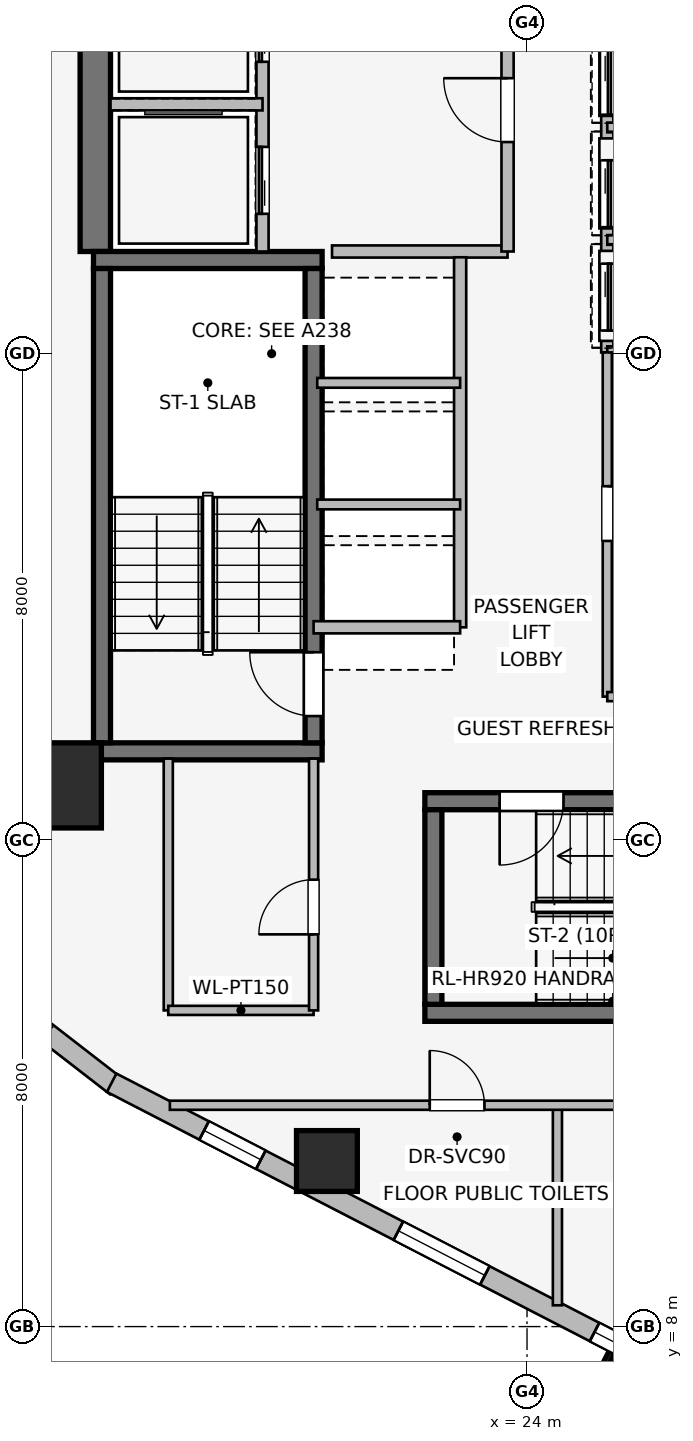
"""IFC4 building model, lengths in metres.
Left out: names, types, materials, properties, quantities, classifications, styles, units other than length and angle.
Written with IfcOpenShell. Run it as: python <this file> out.ifc"""

import sys

from ifc_helpers import new_model, si_unit, direction, frame, frame_2d, origin, origin_2d, place, context, subcontext, project, spatial, rectangle, extrude, element, fill, save


model = new_model("IFC4")
c1 = context("Model", 3, precision=1e-05, world=origin(), true_north=direction((0.0, 1.0)))
c2 = subcontext(c1, "Body", "Model", "MODEL_VIEW")
j1 = project(units=[si_unit("LENGTHUNIT", "METRE"), si_unit("PLANEANGLEUNIT", "RADIAN")], contexts=[c1])
p1 = place(None, origin())
s1 = spatial("IfcSite", under=j1, at=p1, CompositionType="ELEMENT")
p2 = place(p1, origin())
s2 = spatial("IfcBuilding", under=s1, at=p2, CompositionType="ELEMENT")
p3 = place(p2, frame((0.0, 0.0, 136.05)))
s3 = spatial("IfcBuildingStorey", under=s2, at=p3, CompositionType="ELEMENT", Elevation=136.05)
p4 = place(p3, frame((16.9, 25.68, 0.0), z_axis=(0.0, 0.0, 1.0), x_axis=(0.0, 1.0, 0.0)))
e1 = element("IfcWall", 1, at=p4, inside=s3, PredefinedType="SHEAR", context=c2, shape_type="SweptSolid", body=[
    extrude(rectangle(XDim=5.62, YDim=0.5, at=frame_2d((2.81, 0.0))), origin(), (0.0, 0.0, 1.0), 3.45),
])
for number, where, z_axis, x_axis in (
    (2, (16.87, 17.46, 0.0), (0.0, 0.0, 1.0), (1.0, 0.0, 0.0)),
    (3, (20.63, 25.54, 0.0), (0.0, 0.0, 1.0), (-1.0, 0.0, 0.0)),
):
    element("IfcWall", number, at=place(p3, frame(where, z_axis=z_axis, x_axis=x_axis)), inside=s3, PredefinedType="SHEAR", context=c2, shape_type="SweptSolid", body=[
        extrude(rectangle(XDim=3.76, YDim=0.28, at=frame_2d((1.88, 0.0))), origin(), (0.0, 0.0, 1.0), 3.45),
    ])
p5 = place(p3, frame((17.01, 25.4, 0.0), z_axis=(0.0, 0.0, 1.0), x_axis=(0.0, -1.0, 0.0)))
e4 = element("IfcWall", 4, at=p5, inside=s3, PredefinedType="SHEAR", context=c2, shape_type="SweptSolid", body=[
    extrude(rectangle(XDim=7.8, YDim=0.28, at=frame_2d((3.9, 0.0))), origin(), (0.0, 0.0, 1.0), 3.45),
])
p6 = place(p3, frame((20.49, 17.6, 0.0), z_axis=(0.0, 0.0, 1.0), x_axis=(0.0, 1.0, 0.0)))
e5 = element("IfcWall", 5, at=p6, inside=s3, PredefinedType="SHEAR", context=c2, shape_type="SweptSolid", body=[
    extrude(rectangle(XDim=7.8, YDim=0.28, at=frame_2d((3.9, 0.0))), origin(), (0.0, 0.0, 1.0), 3.45),
])
p7 = place(p6, frame((0.44, 0.0, 0.0)))
e6 = element("IfcOpeningElement", 6, at=p7, cuts=e5, PredefinedType="OPENING", context=c2, shape_type="SweptSolid", body=[
    extrude(rectangle(XDim=1.05, YDim=2.0, at=frame_2d((0.525, 1.0))), frame((0.0, 0.15, 0.0), z_axis=(0.0, -1.0, 0.0), x_axis=(1.0, 0.0, 0.0)), (0.0, 0.0, 1.0), 0.3),
])
p8 = place(p3, frame((22.32, 13.16, 0.0), z_axis=(0.0, 0.0, 1.0), x_axis=(1.0, 0.0, 0.0)))
e7 = element("IfcWall", 7, at=p8, inside=s3, PredefinedType="SHEAR", context=c2, shape_type="SweptSolid", body=[
    extrude(rectangle(XDim=8.36, YDim=0.28, at=frame_2d((4.18, 0.0))), origin(), (0.0, 0.0, 1.0), 3.45),
])
p9 = place(p3, frame((30.68, 16.64, 0.0), z_axis=(0.0, 0.0, 1.0), x_axis=(-1.0, 0.0, 0.0)))
e8 = element("IfcWall", 8, at=p9, inside=s3, PredefinedType="SHEAR", context=c2, shape_type="SweptSolid", body=[
    extrude(rectangle(XDim=8.36, YDim=0.28, at=frame_2d((4.18, 0.0))), origin(), (0.0, 0.0, 1.0), 3.45),
])
p10 = place(p9, frame((6.08, 0.0, 0.0)))
e9 = element("IfcOpeningElement", 9, at=p10, cuts=e8, PredefinedType="OPENING", context=c2, shape_type="SweptSolid", body=[
    extrude(rectangle(XDim=1.05, YDim=2.0, at=frame_2d((0.525, 1.0))), frame((0.0, 0.15, 0.0), z_axis=(0.0, -1.0, 0.0), x_axis=(1.0, 0.0, 0.0)), (0.0, 0.0, 1.0), 0.3),
])
p11 = place(p3, frame((22.46, 16.5, 0.0), z_axis=(0.0, 0.0, 1.0), x_axis=(0.0, -1.0, 0.0)))
e10 = element("IfcWall", 10, at=p11, inside=s3, PredefinedType="SHEAR", context=c2, shape_type="SweptSolid", body=[
    extrude(rectangle(XDim=3.2, YDim=0.28, at=frame_2d((1.6, 0.0))), origin(), (0.0, 0.0, 1.0), 3.45),
])
p12 = place(p3, frame((16.3, 16.9, 0.0), z_axis=(0.0, 0.0, 1.0), x_axis=(1.0, 0.0, 0.0)))
e11 = element("IfcColumn", 11, at=p12, inside=s3, PredefinedType="COLUMN", context=c2, shape_type="SweptSolid", body=[
    extrude(rectangle(XDim=1.4, YDim=1.4, at=origin_2d()), origin(), (0.0, 0.0, 1.0), 3.45),
])
p13 = place(p3, frame((20.709, 10.723, 0.0), z_axis=(0.0, 0.0, 1.0), x_axis=(1.0, 0.0, 0.0)))
e12 = element("IfcColumn", 12, at=p13, inside=s3, PredefinedType="COLUMN", context=c2, shape_type="SweptSolid", body=[
    extrude(rectangle(XDim=1.0, YDim=1.0, at=origin_2d()), origin(), (0.0, 0.0, 1.0), 3.45),
])
p14 = place(p3, frame((17.243, 11.95, 0.0), z_axis=(0.0, 0.0, 1.0), x_axis=(-0.790621329885, 0.612305408053, 0.0)))
e13 = element("IfcWall", 13, at=p14, inside=s3, PredefinedType="STANDARD", context=c2, shape_type="SweptSolid", body=[
    extrude(rectangle(XDim=1.676, YDim=0.33, at=frame_2d((0.838, 0.0))), origin(), (0.0, 0.0, 1.0), 3.16),
])
p15 = place(p3, frame((33.769, 3.442, 0.0), z_axis=(0.0, 0.0, 1.0), x_axis=(-0.888613612362, 0.458656568606, 0.0)))
e14 = element("IfcWall", 14, at=p15, inside=s3, PredefinedType="STANDARD", context=c2, shape_type="SweptSolid", body=[
    extrude(rectangle(XDim=18.681, YDim=0.34, at=frame_2d((9.34, 0.0))), origin(), (0.0, 0.0, 1.0), 3.16),
])
p16 = place(p15, frame((1.75, 0.0, 0.75)))
e15 = element("IfcOpeningElement", 15, at=p16, cuts=e14, PredefinedType="OPENING", context=c2, shape_type="SweptSolid", body=[
    extrude(rectangle(XDim=1.05, YDim=1.4, at=frame_2d((0.525, 0.7))), frame((0.0, 0.18, 0.0), z_axis=(0.0, -1.0, 0.0), x_axis=(1.0, 0.0, 0.0)), (0.0, 0.0, 1.0), 0.36),
])
p17 = place(p15, frame((4.765, 0.0, 0.75)))
e16 = element("IfcOpeningElement", 16, at=p17, cuts=e14, PredefinedType="OPENING", context=c2, shape_type="SweptSolid", body=[
    extrude(rectangle(XDim=2.1, YDim=1.5, at=frame_2d((1.05, 0.75))), frame((0.0, 0.18, 0.0), z_axis=(0.0, -1.0, 0.0), x_axis=(1.0, 0.0, 0.0)), (0.0, 0.0, 1.0), 0.36),
])
p18 = place(p15, frame((7.644, 0.0, 0.75)))
e17 = element("IfcOpeningElement", 17, at=p18, cuts=e14, PredefinedType="OPENING", context=c2, shape_type="SweptSolid", body=[
    extrude(rectangle(XDim=2.1, YDim=1.5, at=frame_2d((1.05, 0.75))), frame((0.0, 0.18, 0.0), z_axis=(0.0, -1.0, 0.0), x_axis=(1.0, 0.0, 0.0)), (0.0, 0.0, 1.0), 0.36),
])
p19 = place(p15, frame((11.774, 0.0, 0.75)))
e18 = element("IfcOpeningElement", 18, at=p19, cuts=e14, PredefinedType="OPENING", context=c2, shape_type="SweptSolid", body=[
    extrude(rectangle(XDim=1.6, YDim=1.55, at=frame_2d((0.8, 0.775))), frame((0.0, 0.18, 0.0), z_axis=(0.0, -1.0, 0.0), x_axis=(1.0, 0.0, 0.0)), (0.0, 0.0, 1.0), 0.36),
])
p20 = place(p15, frame((15.92, 0.0, 0.75)))
e19 = element("IfcOpeningElement", 19, at=p20, cuts=e14, PredefinedType="OPENING", context=c2, shape_type="SweptSolid", body=[
    extrude(rectangle(XDim=1.05, YDim=1.4, at=frame_2d((0.525, 0.7))), frame((0.0, 0.18, 0.0), z_axis=(0.0, -1.0, 0.0), x_axis=(1.0, 0.0, 0.0)), (0.0, 0.0, 1.0), 0.36),
])
p21 = place(p3, frame((19.65, 25.68, 0.0), z_axis=(0.0, 0.0, 1.0), x_axis=(0.0, 1.0, 0.0)))
e20 = element("IfcWall", 20, at=p21, inside=s3, PredefinedType="PARTITIONING", context=c2, shape_type="SweptSolid", body=[
    extrude(rectangle(XDim=5.54, YDim=0.2, at=frame_2d((2.77, 0.0))), origin(), (0.0, 0.0, 1.0), 3.16),
])
p22 = place(p21, frame((0.62, 0.0, 0.0)))
e21 = element("IfcOpeningElement", 21, at=p22, cuts=e20, PredefinedType="OPENING", context=c2, shape_type="SweptSolid", body=[
    extrude(rectangle(XDim=1.1, YDim=2.2, at=frame_2d((0.55, 1.1))), frame((0.0, 0.11, 0.0), z_axis=(0.0, -1.0, 0.0), x_axis=(1.0, 0.0, 0.0)), (0.0, 0.0, 1.0), 0.22),
])
p23 = place(p21, frame((3.12, 0.0, 0.0)))
e22 = element("IfcOpeningElement", 22, at=p23, cuts=e20, PredefinedType="OPENING", context=c2, shape_type="SweptSolid", body=[
    extrude(rectangle(XDim=1.1, YDim=2.2, at=frame_2d((0.55, 1.1))), frame((0.0, 0.11, 0.0), z_axis=(0.0, -1.0, 0.0), x_axis=(1.0, 0.0, 0.0)), (0.0, 0.0, 1.0), 0.22),
])
p24 = place(p3, frame((20.793, 25.68, 0.0), z_axis=(0.0, 0.0, 1.0), x_axis=(1.0, 0.0, 0.0)))
e23 = element("IfcWall", 23, at=p24, inside=s3, PredefinedType="PARTITIONING", context=c2, shape_type="SweptSolid", body=[
    extrude(rectangle(XDim=2.887, YDim=0.2, at=frame_2d((1.443, 0.0))), origin(), (0.0, 0.0, 1.0), 3.16),
])
p25 = place(p3, frame((23.68, 25.68, 0.0), z_axis=(0.0, 0.0, 1.0), x_axis=(0.0, 1.0, 0.0)))
e24 = element("IfcWall", 24, at=p25, inside=s3, PredefinedType="PARTITIONING", context=c2, shape_type="SweptSolid", body=[
    extrude(rectangle(XDim=5.54, YDim=0.2, at=frame_2d((2.77, 0.0))), origin(), (0.0, 0.0, 1.0), 3.16),
])
p26 = place(p25, frame((1.8, 0.0, 0.0)))
e25 = element("IfcOpeningElement", 25, at=p26, cuts=e24, PredefinedType="OPENING", context=c2, shape_type="SweptSolid", body=[
    extrude(rectangle(XDim=1.05, YDim=2.0, at=frame_2d((0.525, 1.0))), frame((0.0, 0.11, 0.0), z_axis=(0.0, -1.0, 0.0), x_axis=(1.0, 0.0, 0.0)), (0.0, 0.0, 1.0), 0.22),
])
p27 = place(p3, frame((17.15, 28.1, 0.0), z_axis=(0.0, 0.0, 1.0), x_axis=(1.0, 0.0, 0.0)))
e26 = element("IfcWall", 26, at=p27, inside=s3, PredefinedType="PARTITIONING", context=c2, shape_type="SweptSolid", body=[
    extrude(rectangle(XDim=2.5, YDim=0.2, at=frame_2d((1.25, 0.0))), origin(), (0.0, 0.0, 1.0), 3.16),
])
p28 = place(p3, frame((22.9, 19.5, 0.0), z_axis=(0.0, 0.0, 1.0), x_axis=(0.0, 1.0, 0.0)))
e27 = element("IfcWall", 27, at=p28, inside=s3, PredefinedType="PARTITIONING", context=c2, shape_type="SweptSolid", body=[
    extrude(rectangle(XDim=6.085, YDim=0.2, at=frame_2d((3.042, 0.0))), origin(), (0.0, 0.0, 1.0), 3.16),
])
p29 = place(p3, frame((20.49, 19.5, 0.0), z_axis=(0.0, 0.0, 1.0), x_axis=(1.0, 0.0, 0.0)))
e28 = element("IfcWall", 28, at=p29, inside=s3, PredefinedType="PARTITIONING", context=c2, shape_type="SweptSolid", body=[
    extrude(rectangle(XDim=2.41, YDim=0.2, at=frame_2d((1.205, 0.0))), origin(), (0.0, 0.0, 1.0), 2.06),
])
for number, where, z_axis, x_axis in (
    (29, (20.55, 21.52, 0.0), (0.0, 0.0, 1.0), (1.0, 0.0, 0.0)),
    (30, (20.55, 23.52, 0.0), (0.0, 0.0, 1.0), (1.0, 0.0, 0.0)),
):
    element("IfcWall", number, at=place(p3, frame(where, z_axis=z_axis, x_axis=x_axis)), inside=s3, PredefinedType="PARTITIONING", context=c2, shape_type="SweptSolid", body=[
        extrude(rectangle(XDim=2.35, YDim=0.16, at=frame_2d((1.175, 0.0))), origin(), (0.0, 0.0, 1.0), 3.16),
    ])
p30 = place(p3, frame((25.32, 29.55, 0.0), z_axis=(0.0, 0.0, 1.0), x_axis=(0.0, -1.0, 0.0)))
e31 = element("IfcWall", 31, at=p30, inside=s3, PredefinedType="PARTITIONING", context=c2, shape_type="SweptSolid", body=[
    extrude(rectangle(XDim=5.53, YDim=0.2, at=frame_2d((2.765, 0.0))), origin(), (0.0, 0.0, 1.0), 3.16),
])
p31 = place(p30, frame((0.52, 0.0, 0.0)))
e32 = element("IfcOpeningElement", 32, at=p31, cuts=e31, PredefinedType="OPENING", context=c2, shape_type="SweptSolid", body=[
    extrude(rectangle(XDim=1.1, YDim=2.2, at=frame_2d((0.55, 1.1))), frame((0.0, 0.11, 0.0), z_axis=(0.0, -1.0, 0.0), x_axis=(1.0, 0.0, 0.0)), (0.0, 0.0, 1.0), 0.22),
])
p32 = place(p30, frame((2.37, 0.0, 0.0)))
e33 = element("IfcOpeningElement", 33, at=p32, cuts=e31, PredefinedType="OPENING", context=c2, shape_type="SweptSolid", body=[
    extrude(rectangle(XDim=1.1, YDim=2.2, at=frame_2d((0.55, 1.1))), frame((0.0, 0.11, 0.0), z_axis=(0.0, -1.0, 0.0), x_axis=(1.0, 0.0, 0.0)), (0.0, 0.0, 1.0), 0.22),
])
p33 = place(p30, frame((4.07, 0.0, 0.0)))
e34 = element("IfcOpeningElement", 34, at=p33, cuts=e31, PredefinedType="OPENING", context=c2, shape_type="SweptSolid", body=[
    extrude(rectangle(XDim=1.1, YDim=2.2, at=frame_2d((0.55, 1.1))), frame((0.0, 0.11, 0.0), z_axis=(0.0, -1.0, 0.0), x_axis=(1.0, 0.0, 0.0)), (0.0, 0.0, 1.0), 0.22),
])
p34 = place(p3, frame((25.32, 24.02, 0.0), z_axis=(0.0, 0.0, 1.0), x_axis=(1.0, 0.0, 0.0)))
e35 = element("IfcWall", 35, at=p34, inside=s3, PredefinedType="PARTITIONING", context=c2, shape_type="SweptSolid", body=[
    extrude(rectangle(XDim=2.23, YDim=0.2, at=frame_2d((1.115, 0.0))), origin(), (0.0, 0.0, 1.0), 3.16),
])
for number, where, z_axis, x_axis in (
    (36, (25.32, 25.87, 0.0), (0.0, 0.0, 1.0), (1.0, 0.0, 0.0)),
    (37, (25.32, 27.72, 0.0), (0.0, 0.0, 1.0), (1.0, 0.0, 0.0)),
):
    element("IfcWall", number, at=place(p3, frame(where, z_axis=z_axis, x_axis=x_axis)), inside=s3, PredefinedType="PARTITIONING", context=c2, shape_type="SweptSolid", body=[
        extrude(rectangle(XDim=2.03, YDim=0.16, at=frame_2d((1.015, 0.0))), origin(), (0.0, 0.0, 1.0), 3.16),
    ])
p35 = place(p3, frame((25.32, 24.02, 0.0), z_axis=(0.0, 0.0, 1.0), x_axis=(0.0, -1.0, 0.0)))
e38 = element("IfcWall", 38, at=p35, inside=s3, PredefinedType="PARTITIONING", context=c2, shape_type="SweptSolid", body=[
    extrude(rectangle(XDim=5.66, YDim=0.15, at=frame_2d((2.83, 0.0))), origin(), (0.0, 0.0, 1.0), 3.16),
])
p36 = place(p35, frame((2.2, 0.0, 0.0)))
e39 = element("IfcOpeningElement", 39, at=p36, cuts=e38, PredefinedType="OPENING", context=c2, shape_type="SweptSolid", body=[
    extrude(rectangle(XDim=0.9, YDim=2.0, at=frame_2d((0.45, 1.0))), frame((0.0, 0.085, 0.0), z_axis=(0.0, -1.0, 0.0), x_axis=(1.0, 0.0, 0.0)), (0.0, 0.0, 1.0), 0.17),
])
p37 = place(p3, frame((25.32, 18.36, 0.0), z_axis=(0.0, 0.0, 1.0), x_axis=(1.0, 0.0, 0.0)))
e40 = element("IfcWall", 40, at=p37, inside=s3, PredefinedType="PARTITIONING", context=c2, shape_type="SweptSolid", body=[
    extrude(rectangle(XDim=2.23, YDim=0.15, at=frame_2d((1.115, 0.0))), origin(), (0.0, 0.0, 1.0), 3.16),
])
p38 = place(p3, frame((18.1, 17.34, 0.0), z_axis=(0.0, 0.0, 1.0), x_axis=(0.0, -1.0, 0.0)))
e41 = element("IfcWall", 41, at=p38, inside=s3, PredefinedType="PARTITIONING", context=c2, shape_type="SweptSolid", body=[
    extrude(rectangle(XDim=4.14, YDim=0.15, at=frame_2d((2.07, 0.0))), origin(), (0.0, 0.0, 1.0), 3.16),
])
p39 = place(p3, frame((18.1, 13.2, 0.0), z_axis=(0.0, 0.0, 1.0), x_axis=(1.0, 0.0, 0.0)))
e42 = element("IfcWall", 42, at=p39, inside=s3, PredefinedType="PARTITIONING", context=c2, shape_type="SweptSolid", body=[
    extrude(rectangle(XDim=2.39, YDim=0.15, at=frame_2d((1.195, 0.0))), origin(), (0.0, 0.0, 1.0), 3.16),
])
p40 = place(p3, frame((20.49, 13.2, 0.0), z_axis=(0.0, 0.0, 1.0), x_axis=(0.0, 1.0, 0.0)))
e43 = element("IfcWall", 43, at=p40, inside=s3, PredefinedType="PARTITIONING", context=c2, shape_type="SweptSolid", body=[
    extrude(rectangle(XDim=4.14, YDim=0.15, at=frame_2d((2.07, 0.0))), origin(), (0.0, 0.0, 1.0), 3.16),
])
p41 = place(p40, frame((1.25, 0.0, 0.0)))
e44 = element("IfcOpeningElement", 44, at=p41, cuts=e43, PredefinedType="OPENING", context=c2, shape_type="SweptSolid", body=[
    extrude(rectangle(XDim=0.9, YDim=2.0, at=frame_2d((0.45, 1.0))), frame((0.0, 0.085, 0.0), z_axis=(0.0, -1.0, 0.0), x_axis=(1.0, 0.0, 0.0)), (0.0, 0.0, 1.0), 0.17),
])
p42 = place(p3, frame((24.5, 8.35, 0.0), z_axis=(0.0, 0.0, 1.0), x_axis=(0.0, 1.0, 0.0)))
e45 = element("IfcWall", 45, at=p42, inside=s3, PredefinedType="PARTITIONING", context=c2, shape_type="SweptSolid", body=[
    extrude(rectangle(XDim=3.29, YDim=0.15, at=frame_2d((1.645, 0.0))), origin(), (0.0, 0.0, 1.0), 3.16),
])
p43 = place(p3, frame((18.126, 11.64, 0.0), z_axis=(0.0, 0.0, 1.0), x_axis=(1.0, 0.0, 0.0)))
e46 = element("IfcWall", 46, at=p43, inside=s3, PredefinedType="PARTITIONING", context=c2, shape_type="SweptSolid", body=[
    extrude(rectangle(XDim=14.724, YDim=0.15, at=frame_2d((7.362, 0.0))), origin(), (0.0, 0.0, 1.0), 3.16),
])
p44 = place(p43, frame((4.274, 0.0, 0.0)))
e47 = element("IfcOpeningElement", 47, at=p44, cuts=e46, PredefinedType="OPENING", context=c2, shape_type="SweptSolid", body=[
    extrude(rectangle(XDim=0.9, YDim=2.0, at=frame_2d((0.45, 1.0))), frame((0.0, 0.085, 0.0), z_axis=(0.0, -1.0, 0.0), x_axis=(1.0, 0.0, 0.0)), (0.0, 0.0, 1.0), 0.17),
])
p45 = place(p43, frame((7.724, 0.0, 0.0)))
e48 = element("IfcOpeningElement", 48, at=p45, cuts=e46, PredefinedType="OPENING", context=c2, shape_type="SweptSolid", body=[
    extrude(rectangle(XDim=0.9, YDim=2.0, at=frame_2d((0.45, 1.0))), frame((0.0, 0.085, 0.0), z_axis=(0.0, -1.0, 0.0), x_axis=(1.0, 0.0, 0.0)), (0.0, 0.0, 1.0), 0.17),
])
p46 = place(p18, origin())
e49 = element("IfcWindow", 49, at=p46, inside=s3, PartitioningType="SINGLE_PANEL", PredefinedType="WINDOW", context=c2, shape_type="SweptSolid", body=[
    extrude(rectangle(XDim=2.1, YDim=1.5, at=frame_2d((1.05, 0.75))), frame((0.0, 0.03, 0.0), z_axis=(0.0, -1.0, 0.0), x_axis=(1.0, 0.0, 0.0)), (0.0, 0.0, 1.0), 0.06),
])
fill(e17, e49)
p47 = place(p19, origin())
e50 = element("IfcWindow", 50, at=p47, inside=s3, PartitioningType="SINGLE_PANEL", PredefinedType="WINDOW", context=c2, shape_type="SweptSolid", body=[
    extrude(rectangle(XDim=1.6, YDim=1.55, at=frame_2d((0.8, 0.775))), frame((0.0, 0.03, 0.0), z_axis=(0.0, -1.0, 0.0), x_axis=(1.0, 0.0, 0.0)), (0.0, 0.0, 1.0), 0.06),
])
fill(e18, e50)
p48 = place(p20, origin())
e51 = element("IfcWindow", 51, at=p48, inside=s3, PartitioningType="SINGLE_PANEL", PredefinedType="WINDOW", context=c2, shape_type="SweptSolid", body=[
    extrude(rectangle(XDim=1.05, YDim=1.4, at=frame_2d((0.525, 0.7))), frame((0.0, 0.03, 0.0), z_axis=(0.0, -1.0, 0.0), x_axis=(1.0, 0.0, 0.0)), (0.0, 0.0, 1.0), 0.06),
])
fill(e19, e51)
p49 = place(p7, origin())
e52 = element("IfcDoor", 52, at=p49, inside=s3, OperationType="SINGLE_SWING_RIGHT", PredefinedType="DOOR", context=c2, shape_type="SweptSolid", body=[
    extrude(rectangle(XDim=1.05, YDim=2.0, at=frame_2d((0.525, 1.0))), frame((0.0, 0.025, 0.0), z_axis=(0.0, -1.0, 0.0), x_axis=(1.0, 0.0, 0.0)), (0.0, 0.0, 1.0), 0.05),
])
fill(e6, e52)
p50 = place(p10, origin())
e53 = element("IfcDoor", 53, at=p50, inside=s3, OperationType="SINGLE_SWING_RIGHT", PredefinedType="DOOR", context=c2, shape_type="SweptSolid", body=[
    extrude(rectangle(XDim=1.05, YDim=2.0, at=frame_2d((0.525, 1.0))), frame((0.0, 0.025, 0.0), z_axis=(0.0, -1.0, 0.0), x_axis=(1.0, 0.0, 0.0)), (0.0, 0.0, 1.0), 0.05),
])
fill(e9, e53)
p51 = place(p22, origin())
e54 = element("IfcDoor", 54, at=p51, inside=s3, OperationType="SLIDING_TO_LEFT", PredefinedType="DOOR", context=c2, shape_type="SweptSolid", body=[
    extrude(rectangle(XDim=1.1, YDim=2.2, at=frame_2d((0.55, 1.1))), frame((0.0, 0.025, 0.0), z_axis=(0.0, -1.0, 0.0), x_axis=(1.0, 0.0, 0.0)), (0.0, 0.0, 1.0), 0.05),
])
fill(e21, e54)
p52 = place(p23, origin())
e55 = element("IfcDoor", 55, at=p52, inside=s3, OperationType="SLIDING_TO_LEFT", PredefinedType="DOOR", context=c2, shape_type="SweptSolid", body=[
    extrude(rectangle(XDim=1.1, YDim=2.2, at=frame_2d((0.55, 1.1))), frame((0.0, 0.025, 0.0), z_axis=(0.0, -1.0, 0.0), x_axis=(1.0, 0.0, 0.0)), (0.0, 0.0, 1.0), 0.05),
])
fill(e22, e55)
p53 = place(p26, origin())
e56 = element("IfcDoor", 56, at=p53, inside=s3, OperationType="SINGLE_SWING_RIGHT", PredefinedType="DOOR", context=c2, shape_type="SweptSolid", body=[
    extrude(rectangle(XDim=1.05, YDim=2.0, at=frame_2d((0.525, 1.0))), frame((0.0, 0.025, 0.0), z_axis=(0.0, -1.0, 0.0), x_axis=(1.0, 0.0, 0.0)), (0.0, 0.0, 1.0), 0.05),
])
fill(e25, e56)
p54 = place(p31, origin())
e57 = element("IfcDoor", 57, at=p54, inside=s3, OperationType="SLIDING_TO_LEFT", PredefinedType="DOOR", context=c2, shape_type="SweptSolid", body=[
    extrude(rectangle(XDim=1.1, YDim=2.2, at=frame_2d((0.55, 1.1))), frame((0.0, 0.025, 0.0), z_axis=(0.0, -1.0, 0.0), x_axis=(1.0, 0.0, 0.0)), (0.0, 0.0, 1.0), 0.05),
])
fill(e32, e57)
p55 = place(p32, origin())
e58 = element("IfcDoor", 58, at=p55, inside=s3, OperationType="SLIDING_TO_LEFT", PredefinedType="DOOR", context=c2, shape_type="SweptSolid", body=[
    extrude(rectangle(XDim=1.1, YDim=2.2, at=frame_2d((0.55, 1.1))), frame((0.0, 0.025, 0.0), z_axis=(0.0, -1.0, 0.0), x_axis=(1.0, 0.0, 0.0)), (0.0, 0.0, 1.0), 0.05),
])
fill(e33, e58)
p56 = place(p33, origin())
e59 = element("IfcDoor", 59, at=p56, inside=s3, OperationType="SLIDING_TO_LEFT", PredefinedType="DOOR", context=c2, shape_type="SweptSolid", body=[
    extrude(rectangle(XDim=1.1, YDim=2.2, at=frame_2d((0.55, 1.1))), frame((0.0, 0.025, 0.0), z_axis=(0.0, -1.0, 0.0), x_axis=(1.0, 0.0, 0.0)), (0.0, 0.0, 1.0), 0.05),
])
fill(e34, e59)
p57 = place(p36, origin())
e60 = element("IfcDoor", 60, at=p57, inside=s3, OperationType="SINGLE_SWING_LEFT", PredefinedType="DOOR", context=c2, shape_type="SweptSolid", body=[
    extrude(rectangle(XDim=0.9, YDim=2.0, at=frame_2d((0.45, 1.0))), frame((0.0, 0.025, 0.0), z_axis=(0.0, -1.0, 0.0), x_axis=(1.0, 0.0, 0.0)), (0.0, 0.0, 1.0), 0.05),
])
fill(e39, e60)
p58 = place(p41, origin())
e61 = element("IfcDoor", 61, at=p58, inside=s3, OperationType="SINGLE_SWING_LEFT", PredefinedType="DOOR", context=c2, shape_type="SweptSolid", body=[
    extrude(rectangle(XDim=0.9, YDim=2.0, at=frame_2d((0.45, 1.0))), frame((0.0, 0.025, 0.0), z_axis=(0.0, -1.0, 0.0), x_axis=(1.0, 0.0, 0.0)), (0.0, 0.0, 1.0), 0.05),
])
fill(e44, e61)
p59 = place(p44, origin())
e62 = element("IfcDoor", 62, at=p59, inside=s3, OperationType="SINGLE_SWING_LEFT", PredefinedType="DOOR", context=c2, shape_type="SweptSolid", body=[
    extrude(rectangle(XDim=0.9, YDim=2.0, at=frame_2d((0.45, 1.0))), frame((0.0, 0.025, 0.0), z_axis=(0.0, -1.0, 0.0), x_axis=(1.0, 0.0, 0.0)), (0.0, 0.0, 1.0), 0.05),
])
fill(e47, e62)
save(model, sys.argv[1])
